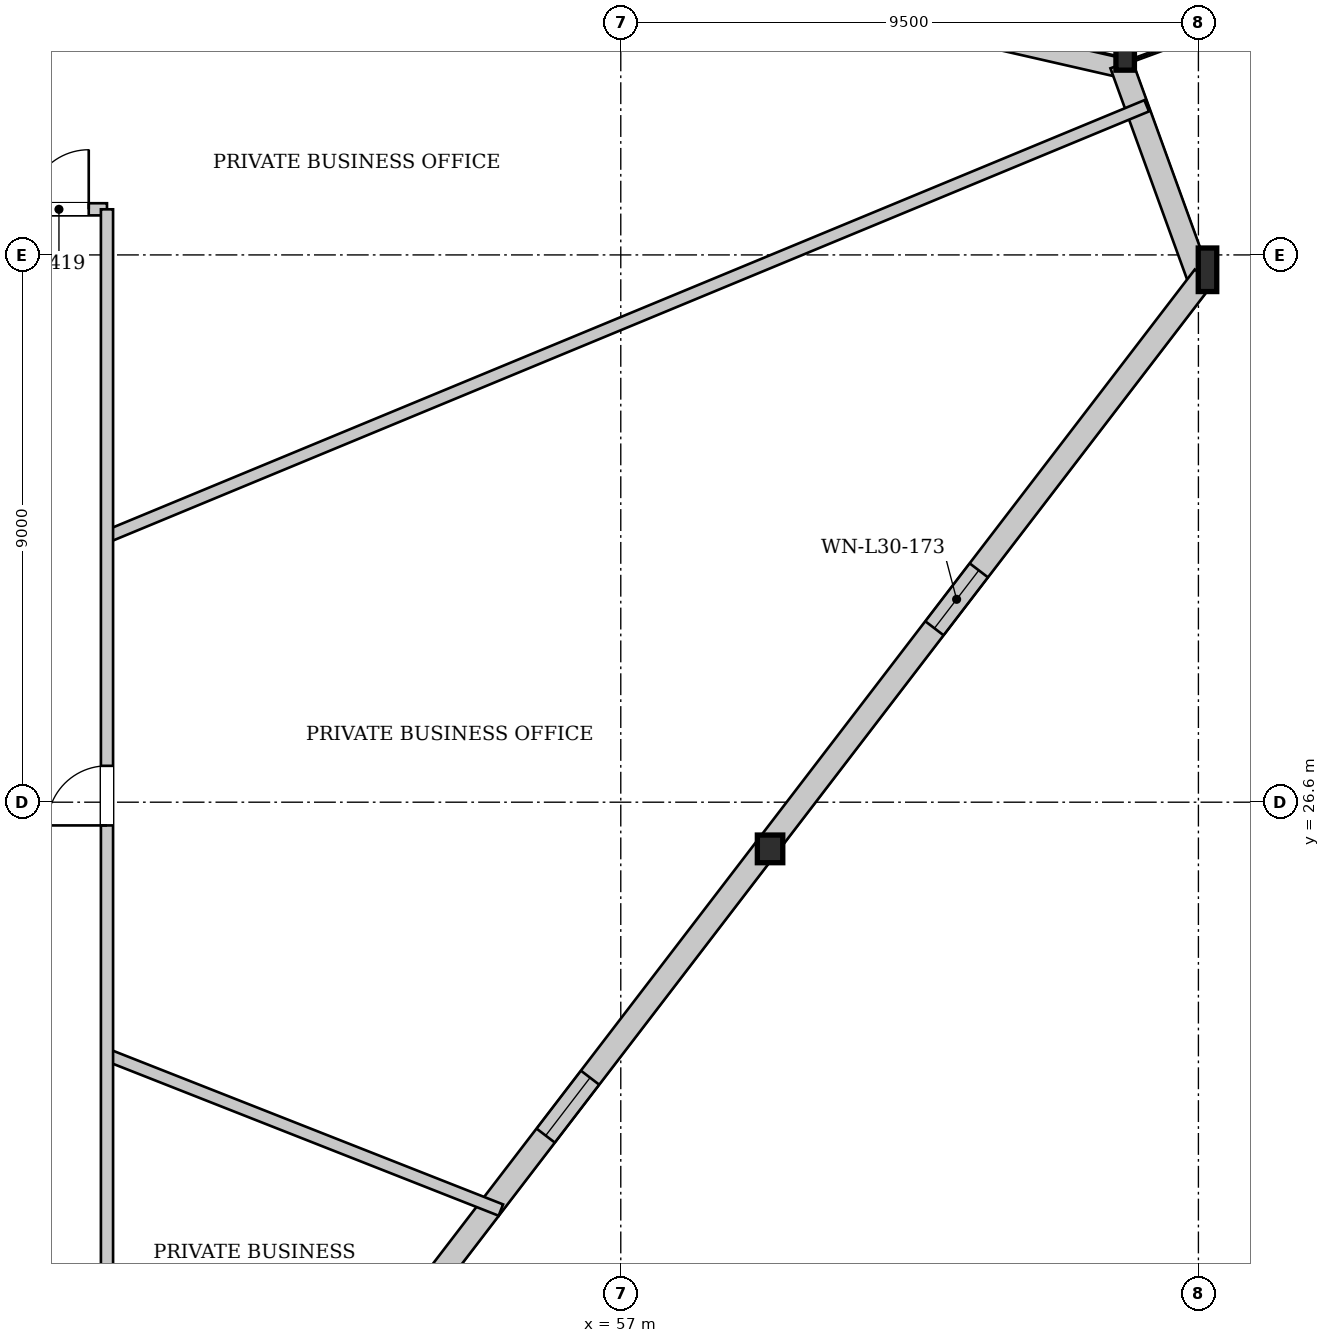
"""IFC4 building model, lengths in metres.
Left out: names, types, materials, properties, quantities, classifications, styles, units other than length and angle.
Written with IfcOpenShell. Run it as: python <this file> out.ifc"""

import sys

from ifc_helpers import new_model, si_unit, direction, frame, frame_2d, origin, origin_2d, place, context, subcontext, project, spatial, rectangle, i_section, extrude, source, transform, mapped, element, fill, save


model = new_model("IFC4")
c1 = context("Model", 3, precision=1e-05, world=origin(), true_north=direction((0.0, 1.0)))
c2 = subcontext(c1, "Body", "Model", "MODEL_VIEW")
j1 = project(units=[si_unit("LENGTHUNIT", "METRE"), si_unit("PLANEANGLEUNIT", "RADIAN")], contexts=[c1])
p1 = place(None, origin())
s1 = spatial("IfcSite", under=j1, at=p1, CompositionType="ELEMENT")
p2 = place(p1, origin())
s2 = spatial("IfcBuilding", under=s1, at=p2, CompositionType="ELEMENT")
p3 = place(p2, frame((0.0, 0.0, 116.35)))
s3 = spatial("IfcBuildingStorey", under=s2, at=p3, CompositionType="ELEMENT", Elevation=116.35)
m1 = source(origin(), c2, "Body", "SweptSolid", [
    extrude(i_section(OverallWidth=0.304, OverallDepth=0.716, WebThickness=0.021, FlangeThickness=0.04, at=origin_2d()), origin(), (0.0, 0.0, 1.0), 3.42),
])
p4 = place(p3, frame((66.742, 35.129, 0.0), z_axis=(-0.054251204611, 0.132273002822, 0.989727568335), x_axis=(-0.925204579621, -0.37946868889, 0.0)))
e1 = element("IfcColumn", 1, at=p4, inside=s3, PredefinedType="COLUMN", context=c2, shape_type="MappedRepresentation", body=[
    mapped(m1, transform((0.0, 0.0, 0.0), x_axis=(1.0, 0.0, 0.0), y_axis=(0.0, 1.0, 0.0), z_axis=(0.0, 0.0, 1.0), scale=1.0)),
])
m2 = source(origin(), c2, "Body", "SweptSolid", [
    extrude(i_section(OverallWidth=0.304, OverallDepth=0.716, WebThickness=0.021, FlangeThickness=0.04, at=origin_2d()), origin(), (0.0, 0.0, 1.0), 3.416),
])
p5 = place(p3, frame((65.41, 38.799, 0.0), z_axis=(-0.067116324205, 0.115648788672, 0.991020058679), x_axis=(-0.86490124279, -0.501942068591, 0.0)))
e2 = element("IfcColumn", 2, at=p5, inside=s3, PredefinedType="COLUMN", context=c2, shape_type="MappedRepresentation", body=[
    mapped(m2, transform((0.0, 0.0, 0.0), x_axis=(1.0, 0.0, 0.0), y_axis=(0.0, 1.0, 0.0), z_axis=(0.0, 0.0, 1.0), scale=1.0)),
])
m3 = source(origin(), c2, "Body", "SweptSolid", [
    extrude(i_section(OverallWidth=0.418, OverallDepth=0.455, WebThickness=0.038, FlangeThickness=0.059, at=origin_2d()), origin(), (0.0, 0.0, 1.0), 3.405),
])
p6 = place(p3, frame((59.477, 25.649, 0.0), z_axis=(-0.013049416701, 0.107478437555, 0.994121772312), x_axis=(-0.992709789554, -0.12052914056, 0.0)))
e3 = element("IfcColumn", 3, at=p6, inside=s3, PredefinedType="COLUMN", context=c2, shape_type="MappedRepresentation", body=[
    mapped(m3, transform((0.0, 0.0, 0.0), x_axis=(1.0, 0.0, 0.0), y_axis=(0.0, 1.0, 0.0), z_axis=(0.0, 0.0, 1.0), scale=1.0)),
])
p7 = place(p3, frame((42.668, 43.828, 0.0), z_axis=(0.0, 0.0, 1.0), x_axis=(0.974904675979, -0.222622713923, 0.0)))
e4 = element("IfcWall", 4, at=p7, inside=s3, PredefinedType="SOLIDWALL", context=c2, shape_type="SweptSolid", body=[
    extrude(rectangle(XDim=23.291, YDim=0.32, at=frame_2d((11.646, 0.0))), origin(), (0.0, 0.0, 1.0), 2.692),
])
p8 = place(p7, frame((6.903, 0.0, 0.0)))
e5 = element("IfcOpeningElement", 5, at=p8, cuts=e4, PredefinedType="OPENING", context=c2, shape_type="SweptSolid", body=[
    extrude(rectangle(XDim=1.1, YDim=2.3, at=frame_2d((0.55, 1.15))), frame((0.0, 0.17, 0.0), z_axis=(0.0, -1.0, 0.0), x_axis=(1.0, 0.0, 0.0)), (0.0, 0.0, 1.0), 0.34),
])
p9 = place(p7, frame((16.335, 0.0, 0.372)))
e6 = element("IfcOpeningElement", 6, at=p9, cuts=e4, PredefinedType="OPENING", context=c2, shape_type="SweptSolid", body=[
    extrude(rectangle(XDim=1.8, YDim=2.2, at=frame_2d((0.9, 1.1))), frame((0.0, 0.17, 0.0), z_axis=(0.0, -1.0, 0.0), x_axis=(1.0, 0.0, 0.0)), (0.0, 0.0, 1.0), 0.34),
])
p10 = place(p3, frame((65.232, 38.734, 0.0), z_axis=(0.0, 0.0, 1.0), x_axis=(0.341220774619, -0.93998318228, 0.0)))
e7 = element("IfcWall", 7, at=p10, inside=s3, PredefinedType="SOLIDWALL", context=c2, shape_type="SweptSolid", body=[
    extrude(rectangle(XDim=3.904, YDim=0.38, at=frame_2d((1.952, 0.0))), origin(), (0.0, 0.0, 1.0), 2.692),
])
p11 = place(p3, frame((66.591, 35.245, 0.0), z_axis=(0.0, 0.0, 1.0), x_axis=(-0.608252150968, -0.7937438635, 0.0)))
e8 = element("IfcWall", 8, at=p11, inside=s3, PredefinedType="SOLIDWALL", context=c2, shape_type="SweptSolid", body=[
    extrude(rectangle(XDim=23.887, YDim=0.38, at=frame_2d((11.944, 0.0))), origin(), (0.0, 0.0, 1.0), 2.692),
])
p12 = place(p11, frame((6.088, 0.0, 0.65)))
e9 = element("IfcOpeningElement", 9, at=p12, cuts=e8, PredefinedType="OPENING", context=c2, shape_type="SweptSolid", body=[
    extrude(rectangle(XDim=1.2, YDim=1.5, at=frame_2d((0.6, 0.75))), frame((0.0, 0.2, 0.0), z_axis=(0.0, -1.0, 0.0), x_axis=(1.0, 0.0, 0.0)), (0.0, 0.0, 1.0), 0.4),
])
p13 = place(p11, frame((16.599, 0.0, 0.65)))
e10 = element("IfcOpeningElement", 10, at=p13, cuts=e8, PredefinedType="OPENING", context=c2, shape_type="SweptSolid", body=[
    extrude(rectangle(XDim=1.2, YDim=1.5, at=frame_2d((0.6, 0.75))), frame((0.0, 0.2, 0.0), z_axis=(0.0, -1.0, 0.0), x_axis=(1.0, 0.0, 0.0)), (0.0, 0.0, 1.0), 0.4),
])
p14 = place(p3, frame((48.55, 22.444, 0.0), z_axis=(0.0, 0.0, 1.0), x_axis=(0.930429770638, -0.366470246964, 0.0)))
e11 = element("IfcWall", 11, at=p14, inside=s3, PredefinedType="PARTITIONING", context=c2, shape_type="SweptSolid", body=[
    extrude(rectangle(XDim=6.962, YDim=0.2, at=frame_2d((3.481, 0.0))), origin(), (0.0, 0.0, 1.0), 3.3),
])
p15 = place(p3, frame((48.55, 30.97, 0.0), z_axis=(0.0, 0.0, 1.0), x_axis=(0.923878084322, 0.382686928585, 0.0)))
e12 = element("IfcWall", 12, at=p15, inside=s3, PredefinedType="PARTITIONING", context=c2, shape_type="SweptSolid", body=[
    extrude(rectangle(XDim=18.508, YDim=0.2, at=frame_2d((9.254, 0.0))), origin(), (0.0, 0.0, 1.0), 3.3),
])
p16 = place(p3, frame((27.45, 36.35, 0.0), z_axis=(0.0, 0.0, 1.0), x_axis=(1.0, 0.0, 0.0)))
e13 = element("IfcWall", 13, at=p16, inside=s3, PredefinedType="PARTITIONING", context=c2, shape_type="SweptSolid", body=[
    extrude(rectangle(XDim=21.1, YDim=0.2, at=frame_2d((10.55, 0.0))), origin(), (0.0, 0.0, 1.0), 3.3),
])
p17 = place(p16, frame((19.82, 0.0, 0.0)))
e14 = element("IfcOpeningElement", 14, at=p17, cuts=e13, PredefinedType="OPENING", context=c2, shape_type="SweptSolid", body=[
    extrude(rectangle(XDim=0.98, YDim=2.15, at=frame_2d((0.49, 1.075))), frame((0.0, 0.11, 0.0), z_axis=(0.0, -1.0, 0.0), x_axis=(1.0, 0.0, 0.0)), (0.0, 0.0, 1.0), 0.22),
])
p18 = place(p16, frame((10.454, 0.0, 0.0)))
e15 = element("IfcOpeningElement", 15, at=p18, cuts=e13, PredefinedType="OPENING", context=c2, shape_type="SweptSolid", body=[
    extrude(rectangle(XDim=0.98, YDim=2.15, at=frame_2d((0.49, 1.075))), frame((0.0, 0.11, 0.0), z_axis=(0.0, -1.0, 0.0), x_axis=(1.0, 0.0, 0.0)), (0.0, 0.0, 1.0), 0.22),
])
p19 = place(p3, frame((48.55, 16.85, 0.0), z_axis=(0.0, 0.0, 1.0), x_axis=(0.0, 1.0, 0.0)))
e16 = element("IfcWall", 16, at=p19, inside=s3, PredefinedType="PARTITIONING", context=c2, shape_type="SweptSolid", body=[
    extrude(rectangle(XDim=19.5, YDim=0.2, at=frame_2d((9.75, 0.0))), origin(), (0.0, 0.0, 1.0), 3.3),
])
p20 = place(p19, frame((9.368, 0.0, 0.0)))
e17 = element("IfcOpeningElement", 17, at=p20, cuts=e16, PredefinedType="OPENING", context=c2, shape_type="SweptSolid", body=[
    extrude(rectangle(XDim=0.98, YDim=2.15, at=frame_2d((0.49, 1.075))), frame((0.0, 0.11, 0.0), z_axis=(0.0, -1.0, 0.0), x_axis=(1.0, 0.0, 0.0)), (0.0, 0.0, 1.0), 0.22),
])
m4 = source(origin(), c2, "Body", "SweptSolid", [
    extrude(rectangle(XDim=1.2, YDim=1.5, at=frame_2d((0.6, 0.75))), frame((0.0, 0.03, 0.0), z_axis=(0.0, -1.0, 0.0), x_axis=(1.0, 0.0, 0.0)), (0.0, 0.0, 1.0), 0.06),
])
p21 = place(p12, origin())
e18 = element("IfcWindow", 18, at=p21, inside=s3, PartitioningType="SINGLE_PANEL", PredefinedType="WINDOW", context=c2, shape_type="MappedRepresentation", body=[
    mapped(m4, transform((0.0, 0.0, 0.0), x_axis=(1.0, 0.0, 0.0), y_axis=(0.0, 1.0, 0.0), z_axis=(0.0, 0.0, 1.0), scale=1.0)),
])
fill(e9, e18)
p22 = place(p13, origin())
e19 = element("IfcWindow", 19, at=p22, inside=s3, PartitioningType="SINGLE_PANEL", PredefinedType="WINDOW", context=c2, shape_type="MappedRepresentation", body=[
    mapped(m4, transform((0.0, 0.0, 0.0), x_axis=(1.0, 0.0, 0.0), y_axis=(0.0, 1.0, 0.0), z_axis=(0.0, 0.0, 1.0), scale=1.0)),
])
fill(e10, e19)
m5 = source(origin(), c2, "Body", "SweptSolid", [
    extrude(rectangle(XDim=0.98, YDim=2.15, at=frame_2d((0.49, 1.075))), frame((0.0, 0.025, 0.0), z_axis=(0.0, -1.0, 0.0), x_axis=(1.0, 0.0, 0.0)), (0.0, 0.0, 1.0), 0.05),
])
p23 = place(p17, origin())
e20 = element("IfcDoor", 20, at=p23, inside=s3, OperationType="SINGLE_SWING_RIGHT", PredefinedType="DOOR", context=c2, shape_type="MappedRepresentation", body=[
    mapped(m5, transform((0.0, 0.0, 0.0), x_axis=(1.0, 0.0, 0.0), y_axis=(0.0, 1.0, 0.0), z_axis=(0.0, 0.0, 1.0), scale=1.0)),
])
fill(e14, e20)
p24 = place(p20, origin())
e21 = element("IfcDoor", 21, at=p24, inside=s3, OperationType="SINGLE_SWING_LEFT", PredefinedType="DOOR", context=c2, shape_type="MappedRepresentation", body=[
    mapped(m5, transform((0.0, 0.0, 0.0), x_axis=(1.0, 0.0, 0.0), y_axis=(0.0, 1.0, 0.0), z_axis=(0.0, 0.0, 1.0), scale=1.0)),
])
fill(e17, e21)
save(model, sys.argv[1])
